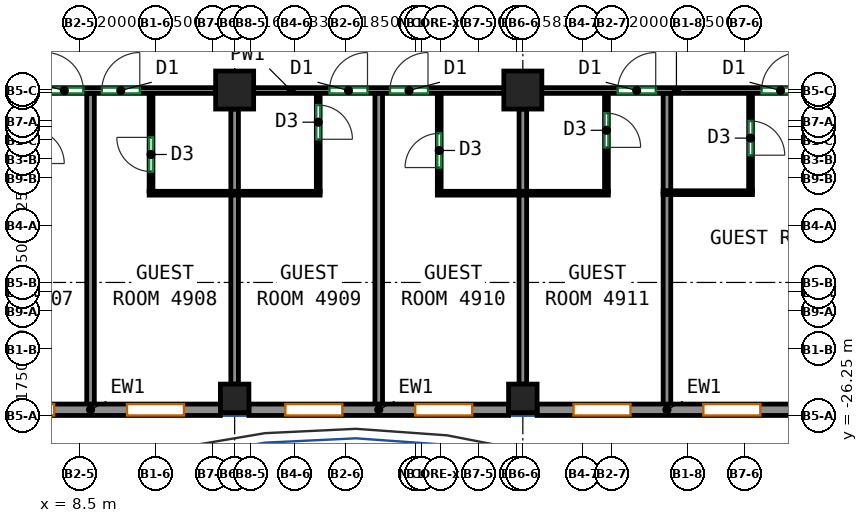
"""IFC4 building model, lengths in metres.
Left out: names, types, materials, properties, quantities, classifications, styles, units other than length and angle.
Written with IfcOpenShell. Run it as: python <this file> out.ifc"""

import sys

from ifc_helpers import new_model, si_unit, direction, frame, frame_2d, origin, origin_2d, place, context, subcontext, project, spatial, rectangle, extrude, source, transform, mapped, element, fill, save


model = new_model("IFC4")
c1 = context("Model", 3, precision=1e-05, world=origin(), true_north=direction((0.0, 1.0)))
c2 = subcontext(c1, "Body", "Model", "MODEL_VIEW")
j1 = project(units=[si_unit("LENGTHUNIT", "METRE"), si_unit("PLANEANGLEUNIT", "RADIAN")], contexts=[c1])
p1 = place(None, origin())
s1 = spatial("IfcSite", under=j1, at=p1, CompositionType="ELEMENT")
p2 = place(p1, origin())
s2 = spatial("IfcBuilding", under=s1, at=p2, CompositionType="ELEMENT")
p3 = place(p2, frame((0.0, 0.0, 203.3)))
s3 = spatial("IfcBuildingStorey", under=s2, at=p3, CompositionType="ELEMENT", Elevation=203.3)
m1 = source(origin(), c2, "Body", "SweptSolid", [
    extrude(rectangle(XDim=0.75, YDim=0.75, at=origin_2d()), origin(), (0.0, 0.0, 1.0), 3.12),
])
p4 = place(p3, frame((12.583, -25.8, 0.0), z_axis=(0.0, 0.0, 1.0), x_axis=(1.0, 0.0, 0.0)))
e1 = element("IfcColumn", 1, at=p4, inside=s3, PredefinedType="COLUMN", context=c2, shape_type="MappedRepresentation", body=[
    mapped(m1, transform((0.0, 0.0, 0.0))),
])
m2 = source(origin(), c2, "Body", "SweptSolid", [
    extrude(rectangle(XDim=1.0, YDim=1.0, at=origin_2d()), origin(), (0.0, 0.0, 1.0), 3.12),
])
p5 = place(p3, frame((12.583, -17.688, 0.0), z_axis=(0.0, 0.0, 1.0), x_axis=(1.0, 0.0, 0.0)))
e2 = element("IfcColumn", 2, at=p5, inside=s3, PredefinedType="COLUMN", context=c2, shape_type="MappedRepresentation", body=[
    mapped(m2, transform((0.0, 0.0, 0.0))),
])
p6 = place(p3, frame((20.167, -25.8, 0.0), z_axis=(0.0, 0.0, 1.0), x_axis=(1.0, 0.0, 0.0)))
e3 = element("IfcColumn", 3, at=p6, inside=s3, PredefinedType="COLUMN", context=c2, shape_type="MappedRepresentation", body=[
    mapped(m1, transform((0.0, 0.0, 0.0))),
])
p7 = place(p3, frame((20.167, -17.688, 0.0), z_axis=(0.0, 0.0, 1.0), x_axis=(1.0, 0.0, 0.0)))
e4 = element("IfcColumn", 4, at=p7, inside=s3, PredefinedType="COLUMN", context=c2, shape_type="MappedRepresentation", body=[
    mapped(m2, transform((0.0, 0.0, 0.0))),
])
m3 = source(origin(), c2, "Body", "SweptSolid", [
    extrude(rectangle(XDim=6.833, YDim=0.3, at=frame_2d((3.417, 0.0))), origin(), (0.0, 0.0, 1.0), 3.12),
])
p8 = place(p3, frame((5.375, -26.1, 0.0), z_axis=(0.0, 0.0, 1.0), x_axis=(1.0, 0.0, 0.0)))
e5 = element("IfcWall", 5, at=p8, inside=s3, PredefinedType="SOLIDWALL", context=c2, shape_type="MappedRepresentation", body=[
    mapped(m3, transform((0.0, 0.0, 0.0))),
])
p9 = place(p8, frame((0.958, 0.0, 0.85)))
e6 = element("IfcOpeningElement", 6, at=p9, cuts=e5, PredefinedType="OPENING", context=c2, shape_type="SweptSolid", body=[
    extrude(rectangle(XDim=1.5, YDim=1.95, at=frame_2d((0.75, 0.975))), frame((0.0, 0.16, 0.0), z_axis=(0.0, -1.0, 0.0), x_axis=(1.0, 0.0, 0.0)), (0.0, 0.0, 1.0), 0.32),
])
p10 = place(p8, frame((4.375, 0.0, 0.85)))
e7 = element("IfcOpeningElement", 7, at=p10, cuts=e5, PredefinedType="OPENING", context=c2, shape_type="SweptSolid", body=[
    extrude(rectangle(XDim=1.5, YDim=1.95, at=frame_2d((0.75, 0.975))), frame((0.0, 0.16, 0.0), z_axis=(0.0, -1.0, 0.0), x_axis=(1.0, 0.0, 0.0)), (0.0, 0.0, 1.0), 0.32),
])
m4 = source(origin(), c2, "Body", "SweptSolid", [
    extrude(rectangle(XDim=6.833, YDim=0.3, at=frame_2d((3.417, 0.0))), origin(), (0.0, 0.0, 1.0), 3.12),
])
p11 = place(p3, frame((12.958, -26.1, 0.0), z_axis=(0.0, 0.0, 1.0), x_axis=(1.0, 0.0, 0.0)))
e8 = element("IfcWall", 8, at=p11, inside=s3, PredefinedType="SOLIDWALL", context=c2, shape_type="MappedRepresentation", body=[
    mapped(m4, transform((0.0, 0.0, 0.0))),
])
p12 = place(p11, frame((0.958, 0.0, 0.85)))
e9 = element("IfcOpeningElement", 9, at=p12, cuts=e8, PredefinedType="OPENING", context=c2, shape_type="SweptSolid", body=[
    extrude(rectangle(XDim=1.5, YDim=1.95, at=frame_2d((0.75, 0.975))), frame((0.0, 0.16, 0.0), z_axis=(0.0, -1.0, 0.0), x_axis=(1.0, 0.0, 0.0)), (0.0, 0.0, 1.0), 0.32),
])
p13 = place(p11, frame((4.375, 0.0, 0.85)))
e10 = element("IfcOpeningElement", 10, at=p13, cuts=e8, PredefinedType="OPENING", context=c2, shape_type="SweptSolid", body=[
    extrude(rectangle(XDim=1.5, YDim=1.95, at=frame_2d((0.75, 0.975))), frame((0.0, 0.16, 0.0), z_axis=(0.0, -1.0, 0.0), x_axis=(1.0, 0.0, 0.0)), (0.0, 0.0, 1.0), 0.32),
])
p14 = place(p3, frame((20.542, -26.1, 0.0), z_axis=(0.0, 0.0, 1.0), x_axis=(1.0, 0.0, 0.0)))
e11 = element("IfcWall", 11, at=p14, inside=s3, PredefinedType="SOLIDWALL", context=c2, shape_type="MappedRepresentation", body=[
    mapped(m3, transform((0.0, 0.0, 0.0))),
])
p15 = place(p14, frame((0.958, 0.0, 0.85)))
e12 = element("IfcOpeningElement", 12, at=p15, cuts=e11, PredefinedType="OPENING", context=c2, shape_type="SweptSolid", body=[
    extrude(rectangle(XDim=1.5, YDim=1.95, at=frame_2d((0.75, 0.975))), frame((0.0, 0.16, 0.0), z_axis=(0.0, -1.0, 0.0), x_axis=(1.0, 0.0, 0.0)), (0.0, 0.0, 1.0), 0.32),
])
p16 = place(p14, frame((4.375, 0.0, 0.85)))
e13 = element("IfcOpeningElement", 13, at=p16, cuts=e11, PredefinedType="OPENING", context=c2, shape_type="SweptSolid", body=[
    extrude(rectangle(XDim=1.5, YDim=1.95, at=frame_2d((0.75, 0.975))), frame((0.0, 0.16, 0.0), z_axis=(0.0, -1.0, 0.0), x_axis=(1.0, 0.0, 0.0)), (0.0, 0.0, 1.0), 0.32),
])
p17 = place(p3, frame((5.5, -17.7, 0.0), z_axis=(0.0, 0.0, 1.0), x_axis=(1.0, 0.0, 0.0)))
e14 = element("IfcWall", 14, at=p17, inside=s3, PredefinedType="PARTITIONING", context=c2, shape_type="SweptSolid", body=[
    extrude(rectangle(XDim=6.583, YDim=0.15, at=frame_2d((3.292, 0.0))), origin(), (0.0, 0.0, 1.0), 3.12),
])
p18 = place(p17, frame((2.101, 0.0, 0.0)))
e15 = element("IfcOpeningElement", 15, at=p18, cuts=e14, PredefinedType="OPENING", context=c2, shape_type="SweptSolid", body=[
    extrude(rectangle(XDim=1.0, YDim=2.1, at=frame_2d((0.5, 1.05))), frame((0.0, 0.085, 0.0), z_axis=(0.0, -1.0, 0.0), x_axis=(1.0, 0.0, 0.0)), (0.0, 0.0, 1.0), 0.17),
])
p19 = place(p17, frame((3.587, 0.0, 0.0)))
e16 = element("IfcOpeningElement", 16, at=p19, cuts=e14, PredefinedType="OPENING", context=c2, shape_type="SweptSolid", body=[
    extrude(rectangle(XDim=1.0, YDim=2.1, at=frame_2d((0.5, 1.05))), frame((0.0, 0.085, 0.0), z_axis=(0.0, -1.0, 0.0), x_axis=(1.0, 0.0, 0.0)), (0.0, 0.0, 1.0), 0.17),
])
p20 = place(p3, frame((13.083, -17.7, 0.0), z_axis=(0.0, 0.0, 1.0), x_axis=(1.0, 0.0, 0.0)))
e17 = element("IfcWall", 17, at=p20, inside=s3, PredefinedType="PARTITIONING", context=c2, shape_type="SweptSolid", body=[
    extrude(rectangle(XDim=6.584, YDim=0.15, at=frame_2d((3.292, 0.0))), origin(), (0.0, 0.0, 1.0), 3.12),
])
p21 = place(p20, frame((1.996, 0.0, 0.0)))
e18 = element("IfcOpeningElement", 18, at=p21, cuts=e17, PredefinedType="OPENING", context=c2, shape_type="SweptSolid", body=[
    extrude(rectangle(XDim=1.0, YDim=2.1, at=frame_2d((0.5, 1.05))), frame((0.0, 0.085, 0.0), z_axis=(0.0, -1.0, 0.0), x_axis=(1.0, 0.0, 0.0)), (0.0, 0.0, 1.0), 0.17),
])
p22 = place(p20, frame((3.588, 0.0, 0.0)))
e19 = element("IfcOpeningElement", 19, at=p22, cuts=e17, PredefinedType="OPENING", context=c2, shape_type="SweptSolid", body=[
    extrude(rectangle(XDim=1.0, YDim=2.1, at=frame_2d((0.5, 1.05))), frame((0.0, 0.085, 0.0), z_axis=(0.0, -1.0, 0.0), x_axis=(1.0, 0.0, 0.0)), (0.0, 0.0, 1.0), 0.17),
])
p23 = place(p3, frame((20.667, -17.7, 0.0), z_axis=(0.0, 0.0, 1.0), x_axis=(1.0, 0.0, 0.0)))
e20 = element("IfcWall", 20, at=p23, inside=s3, PredefinedType="PARTITIONING", context=c2, shape_type="SweptSolid", body=[
    extrude(rectangle(XDim=7.083, YDim=0.15, at=frame_2d((3.542, 0.0))), origin(), (0.0, 0.0, 1.0), 2.52),
])
p24 = place(p23, frame((1.996, 0.0, 0.0)))
e21 = element("IfcOpeningElement", 21, at=p24, cuts=e20, PredefinedType="OPENING", context=c2, shape_type="SweptSolid", body=[
    extrude(rectangle(XDim=1.0, YDim=2.1, at=frame_2d((0.5, 1.05))), frame((0.0, 0.085, 0.0), z_axis=(0.0, -1.0, 0.0), x_axis=(1.0, 0.0, 0.0)), (0.0, 0.0, 1.0), 0.17),
])
p25 = place(p23, frame((5.782, 0.0, 0.0)))
e22 = element("IfcOpeningElement", 22, at=p25, cuts=e20, PredefinedType="OPENING", context=c2, shape_type="SweptSolid", body=[
    extrude(rectangle(XDim=1.0, YDim=2.1, at=frame_2d((0.5, 1.05))), frame((0.0, 0.085, 0.0), z_axis=(0.0, -1.0, 0.0), x_axis=(1.0, 0.0, 0.0)), (0.0, 0.0, 1.0), 0.17),
])
p26 = place(p3, frame((8.791, -26.0, 0.0), z_axis=(0.0, 0.0, 1.0), x_axis=(0.0, 1.0, 0.0)))
e23 = element("IfcWall", 23, at=p26, inside=s3, PredefinedType="PARTITIONING", context=c2, shape_type="SweptSolid", body=[
    extrude(rectangle(XDim=8.223, YDim=0.2, at=frame_2d((4.111, 0.0))), origin(), (0.0, 0.0, 1.0), 3.12),
])
p27 = place(p3, frame((10.383, -20.352, 0.0), z_axis=(0.0, 0.0, 1.0), x_axis=(0.0, 1.0, 0.0)))
e24 = element("IfcWall", 24, at=p27, inside=s3, PredefinedType="PARTITIONING", context=c2, shape_type="SweptSolid", body=[
    extrude(rectangle(XDim=2.575, YDim=0.1, at=frame_2d((1.288, 0.0))), origin(), (0.0, 0.0, 1.0), 3.12),
])
p28 = place(p27, frame((0.519, 0.0, 0.0)))
e25 = element("IfcOpeningElement", 25, at=p28, cuts=e24, PredefinedType="OPENING", context=c2, shape_type="SweptSolid", body=[
    extrude(rectangle(XDim=0.9, YDim=2.1, at=frame_2d((0.45, 1.05))), frame((0.0, 0.06, 0.0), z_axis=(0.0, -1.0, 0.0), x_axis=(1.0, 0.0, 0.0)), (0.0, 0.0, 1.0), 0.12),
])
p29 = place(p3, frame((10.333, -20.402, 0.0), z_axis=(0.0, 0.0, 1.0), x_axis=(1.0, 0.0, 0.0)))
e26 = element("IfcWall", 26, at=p29, inside=s3, PredefinedType="PARTITIONING", context=c2, shape_type="SweptSolid", body=[
    extrude(rectangle(XDim=4.5, YDim=0.1, at=frame_2d((2.25, 0.0))), origin(), (0.0, 0.0, 1.0), 3.12),
])
p30 = place(p3, frame((12.583, -25.425, 0.0), z_axis=(0.0, 0.0, 1.0), x_axis=(0.0, 1.0, 0.0)))
e27 = element("IfcWall", 27, at=p30, inside=s3, PredefinedType="PARTITIONING", context=c2, shape_type="SweptSolid", body=[
    extrude(rectangle(XDim=4.973, YDim=0.2, at=frame_2d((2.487, 0.0))), origin(), (0.0, 0.0, 1.0), 3.12),
])
p31 = place(p3, frame((12.583, -20.352, 0.0), z_axis=(0.0, 0.0, 1.0), x_axis=(0.0, 1.0, 0.0)))
e28 = element("IfcWall", 28, at=p31, inside=s3, PredefinedType="PARTITIONING", context=c2, shape_type="SweptSolid", body=[
    extrude(rectangle(XDim=2.164, YDim=0.2, at=frame_2d((1.082, 0.0))), origin(), (0.0, 0.0, 1.0), 3.12),
])
p32 = place(p3, frame((14.783, -17.777, 0.0), z_axis=(0.0, 0.0, 1.0), x_axis=(0.0, -1.0, 0.0)))
e29 = element("IfcWall", 29, at=p32, inside=s3, PredefinedType="PARTITIONING", context=c2, shape_type="SweptSolid", body=[
    extrude(rectangle(XDim=2.575, YDim=0.1, at=frame_2d((1.288, 0.0))), origin(), (0.0, 0.0, 1.0), 3.12),
])
p33 = place(p32, frame((0.306, 0.0, 0.0)))
e30 = element("IfcOpeningElement", 30, at=p33, cuts=e29, PredefinedType="OPENING", context=c2, shape_type="SweptSolid", body=[
    extrude(rectangle(XDim=0.9, YDim=2.1, at=frame_2d((0.45, 1.05))), frame((0.0, 0.06, 0.0), z_axis=(0.0, -1.0, 0.0), x_axis=(1.0, 0.0, 0.0)), (0.0, 0.0, 1.0), 0.12),
])
p34 = place(p3, frame((16.375, -26.0, 0.0), z_axis=(0.0, 0.0, 1.0), x_axis=(0.0, 1.0, 0.0)))
e31 = element("IfcWall", 31, at=p34, inside=s3, PredefinedType="PARTITIONING", context=c2, shape_type="SweptSolid", body=[
    extrude(rectangle(XDim=8.223, YDim=0.2, at=frame_2d((4.111, 0.0))), origin(), (0.0, 0.0, 1.0), 3.12),
])
p35 = place(p3, frame((17.967, -20.352, 0.0), z_axis=(0.0, 0.0, 1.0), x_axis=(0.0, 1.0, 0.0)))
e32 = element("IfcWall", 32, at=p35, inside=s3, PredefinedType="PARTITIONING", context=c2, shape_type="SweptSolid", body=[
    extrude(rectangle(XDim=2.575, YDim=0.1, at=frame_2d((1.288, 0.0))), origin(), (0.0, 0.0, 1.0), 3.12),
])
p36 = place(p35, frame((0.625, 0.0, 0.0)))
e33 = element("IfcOpeningElement", 33, at=p36, cuts=e32, PredefinedType="OPENING", context=c2, shape_type="SweptSolid", body=[
    extrude(rectangle(XDim=0.9, YDim=2.1, at=frame_2d((0.45, 1.05))), frame((0.0, 0.06, 0.0), z_axis=(0.0, -1.0, 0.0), x_axis=(1.0, 0.0, 0.0)), (0.0, 0.0, 1.0), 0.12),
])
p37 = place(p3, frame((17.917, -20.402, 0.0), z_axis=(0.0, 0.0, 1.0), x_axis=(1.0, 0.0, 0.0)))
e34 = element("IfcWall", 34, at=p37, inside=s3, PredefinedType="PARTITIONING", context=c2, shape_type="SweptSolid", body=[
    extrude(rectangle(XDim=4.5, YDim=0.1, at=frame_2d((2.25, 0.0))), origin(), (0.0, 0.0, 1.0), 3.12),
])
p38 = place(p3, frame((20.167, -25.425, 0.0), z_axis=(0.0, 0.0, 1.0), x_axis=(0.0, 1.0, 0.0)))
e35 = element("IfcWall", 35, at=p38, inside=s3, PredefinedType="PARTITIONING", context=c2, shape_type="SweptSolid", body=[
    extrude(rectangle(XDim=4.973, YDim=0.2, at=frame_2d((2.487, 0.0))), origin(), (0.0, 0.0, 1.0), 3.12),
])
p39 = place(p3, frame((20.167, -20.352, 0.0), z_axis=(0.0, 0.0, 1.0), x_axis=(0.0, 1.0, 0.0)))
e36 = element("IfcWall", 36, at=p39, inside=s3, PredefinedType="PARTITIONING", context=c2, shape_type="SweptSolid", body=[
    extrude(rectangle(XDim=2.164, YDim=0.2, at=frame_2d((1.082, 0.0))), origin(), (0.0, 0.0, 1.0), 3.12),
])
p40 = place(p3, frame((22.367, -17.777, 0.0), z_axis=(0.0, 0.0, 1.0), x_axis=(0.0, -1.0, 0.0)))
e37 = element("IfcWall", 37, at=p40, inside=s3, PredefinedType="PARTITIONING", context=c2, shape_type="SweptSolid", body=[
    extrude(rectangle(XDim=2.575, YDim=0.1, at=frame_2d((1.288, 0.0))), origin(), (0.0, 0.0, 1.0), 3.12),
])
p41 = place(p40, frame((0.519, 0.0, 0.0)))
e38 = element("IfcOpeningElement", 38, at=p41, cuts=e37, PredefinedType="OPENING", context=c2, shape_type="SweptSolid", body=[
    extrude(rectangle(XDim=0.9, YDim=2.1, at=frame_2d((0.45, 1.05))), frame((0.0, 0.06, 0.0), z_axis=(0.0, -1.0, 0.0), x_axis=(1.0, 0.0, 0.0)), (0.0, 0.0, 1.0), 0.12),
])
p42 = place(p3, frame((23.959, -26.0, 0.0), z_axis=(0.0, 0.0, 1.0), x_axis=(0.0, 1.0, 0.0)))
e39 = element("IfcWall", 39, at=p42, inside=s3, PredefinedType="PARTITIONING", context=c2, shape_type="SweptSolid", body=[
    extrude(rectangle(XDim=5.572, YDim=0.2, at=frame_2d((2.786, 0.0))), origin(), (0.0, 0.0, 1.0), 3.12),
])
p43 = place(p3, frame((23.959, -20.348, 0.0), z_axis=(0.0, 0.0, 1.0), x_axis=(0.0, 1.0, 0.0)))
e40 = element("IfcWall", 40, at=p43, inside=s3, PredefinedType="PARTITIONING", context=c2, shape_type="SweptSolid", body=[
    extrude(rectangle(XDim=2.571, YDim=0.2, at=frame_2d((1.285, 0.0))), origin(), (0.0, 0.0, 1.0), 3.12),
])
p44 = place(p3, frame((23.859, -20.388, 0.0), z_axis=(0.0, 0.0, 1.0), x_axis=(1.0, 0.0, 0.0)))
e41 = element("IfcWall", 41, at=p44, inside=s3, PredefinedType="PARTITIONING", context=c2, shape_type="SweptSolid", body=[
    extrude(rectangle(XDim=2.35, YDim=0.1, at=frame_2d((1.175, 0.0))), origin(), (0.0, 0.0, 1.0), 3.12),
])
p45 = place(p3, frame((26.159, -17.777, 0.0), z_axis=(0.0, 0.0, 1.0), x_axis=(0.0, -1.0, 0.0)))
e42 = element("IfcWall", 42, at=p45, inside=s3, PredefinedType="PARTITIONING", context=c2, shape_type="SweptSolid", body=[
    extrude(rectangle(XDim=2.561, YDim=0.1, at=frame_2d((1.28, 0.0))), origin(), (0.0, 0.0, 1.0), 3.12),
])
p46 = place(p45, frame((0.725, 0.0, 0.0)))
e43 = element("IfcOpeningElement", 43, at=p46, cuts=e42, PredefinedType="OPENING", context=c2, shape_type="SweptSolid", body=[
    extrude(rectangle(XDim=0.9, YDim=2.1, at=frame_2d((0.45, 1.05))), frame((0.0, 0.06, 0.0), z_axis=(0.0, -1.0, 0.0), x_axis=(1.0, 0.0, 0.0)), (0.0, 0.0, 1.0), 0.12),
])
p47 = place(p9, origin())
e44 = element("IfcWindow", 44, at=p47, inside=s3, PartitioningType="SINGLE_PANEL", PredefinedType="WINDOW", context=c2, shape_type="SweptSolid", body=[
    extrude(rectangle(XDim=1.5, YDim=1.95, at=frame_2d((0.75, 0.975))), frame((0.0, 0.03, 0.0), z_axis=(0.0, -1.0, 0.0), x_axis=(1.0, 0.0, 0.0)), (0.0, 0.0, 1.0), 0.06),
])
fill(e6, e44)
p48 = place(p10, origin())
e45 = element("IfcWindow", 45, at=p48, inside=s3, PartitioningType="SINGLE_PANEL", PredefinedType="WINDOW", context=c2, shape_type="SweptSolid", body=[
    extrude(rectangle(XDim=1.5, YDim=1.95, at=frame_2d((0.75, 0.975))), frame((0.0, 0.03, 0.0), z_axis=(0.0, -1.0, 0.0), x_axis=(1.0, 0.0, 0.0)), (0.0, 0.0, 1.0), 0.06),
])
fill(e7, e45)
p49 = place(p12, origin())
e46 = element("IfcWindow", 46, at=p49, inside=s3, PartitioningType="SINGLE_PANEL", PredefinedType="WINDOW", context=c2, shape_type="SweptSolid", body=[
    extrude(rectangle(XDim=1.5, YDim=1.95, at=frame_2d((0.75, 0.975))), frame((0.0, 0.03, 0.0), z_axis=(0.0, -1.0, 0.0), x_axis=(1.0, 0.0, 0.0)), (0.0, 0.0, 1.0), 0.06),
])
fill(e9, e46)
p50 = place(p13, origin())
e47 = element("IfcWindow", 47, at=p50, inside=s3, PartitioningType="SINGLE_PANEL", PredefinedType="WINDOW", context=c2, shape_type="SweptSolid", body=[
    extrude(rectangle(XDim=1.5, YDim=1.95, at=frame_2d((0.75, 0.975))), frame((0.0, 0.03, 0.0), z_axis=(0.0, -1.0, 0.0), x_axis=(1.0, 0.0, 0.0)), (0.0, 0.0, 1.0), 0.06),
])
fill(e10, e47)
p51 = place(p15, origin())
e48 = element("IfcWindow", 48, at=p51, inside=s3, PartitioningType="SINGLE_PANEL", PredefinedType="WINDOW", context=c2, shape_type="SweptSolid", body=[
    extrude(rectangle(XDim=1.5, YDim=1.95, at=frame_2d((0.75, 0.975))), frame((0.0, 0.03, 0.0), z_axis=(0.0, -1.0, 0.0), x_axis=(1.0, 0.0, 0.0)), (0.0, 0.0, 1.0), 0.06),
])
fill(e12, e48)
p52 = place(p16, origin())
e49 = element("IfcWindow", 49, at=p52, inside=s3, PartitioningType="SINGLE_PANEL", PredefinedType="WINDOW", context=c2, shape_type="SweptSolid", body=[
    extrude(rectangle(XDim=1.5, YDim=1.95, at=frame_2d((0.75, 0.975))), frame((0.0, 0.03, 0.0), z_axis=(0.0, -1.0, 0.0), x_axis=(1.0, 0.0, 0.0)), (0.0, 0.0, 1.0), 0.06),
])
fill(e13, e49)
p53 = place(p28, origin())
e50 = element("IfcDoor", 50, at=p53, inside=s3, OperationType="SINGLE_SWING_RIGHT", PredefinedType="DOOR", context=c2, shape_type="SweptSolid", body=[
    extrude(rectangle(XDim=0.9, YDim=2.1, at=frame_2d((0.45, 1.05))), frame((0.0, 0.025, 0.0), z_axis=(0.0, -1.0, 0.0), x_axis=(1.0, 0.0, 0.0)), (0.0, 0.0, 1.0), 0.05),
])
fill(e25, e50)
p54 = place(p36, origin())
e51 = element("IfcDoor", 51, at=p54, inside=s3, OperationType="SINGLE_SWING_LEFT", PredefinedType="DOOR", context=c2, shape_type="SweptSolid", body=[
    extrude(rectangle(XDim=0.9, YDim=2.1, at=frame_2d((0.45, 1.05))), frame((0.0, 0.025, 0.0), z_axis=(0.0, -1.0, 0.0), x_axis=(1.0, 0.0, 0.0)), (0.0, 0.0, 1.0), 0.05),
])
fill(e33, e51)
p55 = place(p46, origin())
e52 = element("IfcDoor", 52, at=p55, inside=s3, OperationType="SINGLE_SWING_RIGHT", PredefinedType="DOOR", context=c2, shape_type="SweptSolid", body=[
    extrude(rectangle(XDim=0.9, YDim=2.1, at=frame_2d((0.45, 1.05))), frame((0.0, 0.025, 0.0), z_axis=(0.0, -1.0, 0.0), x_axis=(1.0, 0.0, 0.0)), (0.0, 0.0, 1.0), 0.05),
])
fill(e43, e52)
p56 = place(p41, origin())
e53 = element("IfcDoor", 53, at=p56, inside=s3, OperationType="SINGLE_SWING_RIGHT", PredefinedType="DOOR", context=c2, shape_type="SweptSolid", body=[
    extrude(rectangle(XDim=0.9, YDim=2.1, at=frame_2d((0.45, 1.05))), frame((0.0, 0.025, 0.0), z_axis=(0.0, -1.0, 0.0), x_axis=(1.0, 0.0, 0.0)), (0.0, 0.0, 1.0), 0.05),
])
fill(e38, e53)
p57 = place(p33, origin())
e54 = element("IfcDoor", 54, at=p57, inside=s3, OperationType="SINGLE_SWING_RIGHT", PredefinedType="DOOR", context=c2, shape_type="SweptSolid", body=[
    extrude(rectangle(XDim=0.9, YDim=2.1, at=frame_2d((0.45, 1.05))), frame((0.0, 0.025, 0.0), z_axis=(0.0, -1.0, 0.0), x_axis=(1.0, 0.0, 0.0)), (0.0, 0.0, 1.0), 0.05),
])
fill(e30, e54)
p58 = place(p18, origin())
e55 = element("IfcDoor", 55, at=p58, inside=s3, OperationType="SINGLE_SWING_LEFT", PredefinedType="DOOR", context=c2, shape_type="SweptSolid", body=[
    extrude(rectangle(XDim=1.0, YDim=2.1, at=frame_2d((0.5, 1.05))), frame((0.0, 0.025, 0.0), z_axis=(0.0, -1.0, 0.0), x_axis=(1.0, 0.0, 0.0)), (0.0, 0.0, 1.0), 0.05),
])
fill(e15, e55)
p59 = place(p19, origin())
e56 = element("IfcDoor", 56, at=p59, inside=s3, OperationType="SINGLE_SWING_RIGHT", PredefinedType="DOOR", context=c2, shape_type="SweptSolid", body=[
    extrude(rectangle(XDim=1.0, YDim=2.1, at=frame_2d((0.5, 1.05))), frame((0.0, 0.025, 0.0), z_axis=(0.0, -1.0, 0.0), x_axis=(1.0, 0.0, 0.0)), (0.0, 0.0, 1.0), 0.05),
])
fill(e16, e56)
p60 = place(p21, origin())
e57 = element("IfcDoor", 57, at=p60, inside=s3, OperationType="SINGLE_SWING_RIGHT", PredefinedType="DOOR", context=c2, shape_type="SweptSolid", body=[
    extrude(rectangle(XDim=1.0, YDim=2.1, at=frame_2d((0.5, 1.05))), frame((0.0, 0.025, 0.0), z_axis=(0.0, -1.0, 0.0), x_axis=(1.0, 0.0, 0.0)), (0.0, 0.0, 1.0), 0.05),
])
fill(e18, e57)
p61 = place(p22, origin())
e58 = element("IfcDoor", 58, at=p61, inside=s3, OperationType="SINGLE_SWING_RIGHT", PredefinedType="DOOR", context=c2, shape_type="SweptSolid", body=[
    extrude(rectangle(XDim=1.0, YDim=2.1, at=frame_2d((0.5, 1.05))), frame((0.0, 0.025, 0.0), z_axis=(0.0, -1.0, 0.0), x_axis=(1.0, 0.0, 0.0)), (0.0, 0.0, 1.0), 0.05),
])
fill(e19, e58)
p62 = place(p24, origin())
e59 = element("IfcDoor", 59, at=p62, inside=s3, OperationType="SINGLE_SWING_RIGHT", PredefinedType="DOOR", context=c2, shape_type="SweptSolid", body=[
    extrude(rectangle(XDim=1.0, YDim=2.1, at=frame_2d((0.5, 1.05))), frame((0.0, 0.025, 0.0), z_axis=(0.0, -1.0, 0.0), x_axis=(1.0, 0.0, 0.0)), (0.0, 0.0, 1.0), 0.05),
])
fill(e21, e59)
p63 = place(p25, origin())
e60 = element("IfcDoor", 60, at=p63, inside=s3, OperationType="SINGLE_SWING_RIGHT", PredefinedType="DOOR", context=c2, shape_type="SweptSolid", body=[
    extrude(rectangle(XDim=1.0, YDim=2.1, at=frame_2d((0.5, 1.05))), frame((0.0, 0.025, 0.0), z_axis=(0.0, -1.0, 0.0), x_axis=(1.0, 0.0, 0.0)), (0.0, 0.0, 1.0), 0.05),
])
fill(e22, e60)
save(model, sys.argv[1])
